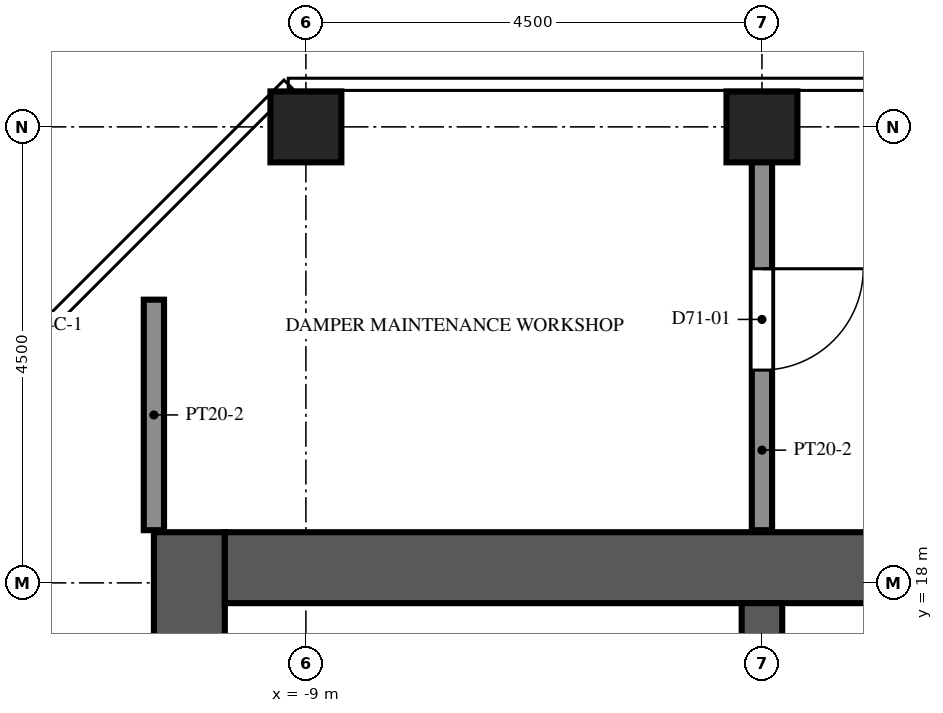
"""IFC4 building model, lengths in metres.
Left out: names, types, materials, properties, quantities, classifications, styles, units other than length and angle.
Written with IfcOpenShell. Run it as: python <this file> out.ifc"""

import sys

from ifc_helpers import new_model, si_unit, direction, frame, frame_2d, origin, origin_2d, place, context, subcontext, project, spatial, rectangle, extrude, element, fill, save


model = new_model("IFC4")
c1 = context("Model", 3, precision=1e-05, world=origin(), true_north=direction((0.0, 1.0)))
c2 = subcontext(c1, "Body", "Model", "MODEL_VIEW")
j1 = project(units=[si_unit("LENGTHUNIT", "METRE"), si_unit("PLANEANGLEUNIT", "RADIAN")], contexts=[c1])
p1 = place(None, origin())
s1 = spatial("IfcSite", under=j1, at=p1, CompositionType="ELEMENT")
p2 = place(p1, origin())
s2 = spatial("IfcBuilding", under=s1, at=p2, CompositionType="ELEMENT")
p3 = place(p2, frame((0.0, 0.0, 316.6)))
s3 = spatial("IfcBuildingStorey", under=s2, at=p3, CompositionType="ELEMENT", Elevation=316.6)
for number, where, z_axis, x_axis in (
    (1, (-9.0, 22.5, 0.0), (0.0, 0.0, 1.0), (1.0, 0.0, 0.0)),
    (2, (-4.5, 22.5, 0.0), (0.0, 0.0, 1.0), (1.0, 0.0, 0.0)),
):
    element("IfcColumn", number, at=place(p3, frame(where, z_axis=z_axis, x_axis=x_axis)), inside=s3, PredefinedType="COLUMN", context=c2, shape_type="SweptSolid", body=[
        extrude(rectangle(XDim=0.7, YDim=0.7, at=origin_2d()), origin(), (0.0, 0.0, 1.0), 4.8),
    ])
p4 = place(p3, frame((-10.15, -9.0, 0.0), z_axis=(0.0, 0.0, 1.0), x_axis=(0.0, 1.0, 0.0)))
e3 = element("IfcWall", 3, at=p4, inside=s3, PredefinedType="SHEAR", context=c2, shape_type="SweptSolid", body=[
    extrude(rectangle(XDim=27.5, YDim=0.7, at=frame_2d((13.75, 0.0))), origin(), (0.0, 0.0, 1.0), 4.8),
])
p5 = place(p4, frame((12.55, 0.0, 0.0)))
e4 = element("IfcOpeningElement", 4, at=p5, cuts=e3, PredefinedType="OPENING", context=c2, shape_type="SweptSolid", body=[
    extrude(rectangle(XDim=2.4, YDim=2.4, at=frame_2d((1.2, 1.2))), frame((0.0, 0.36, 0.0), z_axis=(0.0, -1.0, 0.0), x_axis=(1.0, 0.0, 0.0)), (0.0, 0.0, 1.0), 0.72),
])
p6 = place(p4, frame((6.825, 0.0, 0.0)))
e5 = element("IfcOpeningElement", 5, at=p6, cuts=e3, PredefinedType="OPENING", context=c2, shape_type="SweptSolid", body=[
    extrude(rectangle(XDim=1.2, YDim=2.1, at=frame_2d((0.6, 1.05))), frame((0.0, 0.36, 0.0), z_axis=(0.0, -1.0, 0.0), x_axis=(1.0, 0.0, 0.0)), (0.0, 0.0, 1.0), 0.72),
])
p7 = place(p4, frame((19.475, 0.0, 0.0)))
e6 = element("IfcOpeningElement", 6, at=p7, cuts=e3, PredefinedType="OPENING", context=c2, shape_type="SweptSolid", body=[
    extrude(rectangle(XDim=1.2, YDim=2.1, at=frame_2d((0.6, 1.05))), frame((0.0, 0.36, 0.0), z_axis=(0.0, -1.0, 0.0), x_axis=(1.0, 0.0, 0.0)), (0.0, 0.0, 1.0), 0.72),
])
p8 = place(p3, frame((-9.8, 18.15, 0.0), z_axis=(0.0, 0.0, 1.0), x_axis=(1.0, 0.0, 0.0)))
e7 = element("IfcWall", 7, at=p8, inside=s3, PredefinedType="SHEAR", context=c2, shape_type="SweptSolid", body=[
    extrude(rectangle(XDim=10.6, YDim=0.7, at=frame_2d((5.3, 0.0))), origin(), (0.0, 0.0, 1.0), 4.8),
])
p9 = place(p3, frame((-4.5, 10.2, 0.0), z_axis=(0.0, 0.0, 1.0), x_axis=(0.0, 1.0, 0.0)))
e8 = element("IfcWall", 8, at=p9, inside=s3, PredefinedType="SHEAR", context=c2, shape_type="SweptSolid", body=[
    extrude(rectangle(XDim=7.6, YDim=0.4, at=frame_2d((3.8, 0.0))), origin(), (0.0, 0.0, 1.0), 4.8),
])
p10 = place(p3, frame((-10.5, 18.52, 0.0), z_axis=(0.0, 0.0, 1.0), x_axis=(0.0, 1.0, 0.0)))
e9 = element("IfcWall", 9, at=p10, inside=s3, PredefinedType="PARTITIONING", context=c2, shape_type="SweptSolid", body=[
    extrude(rectangle(XDim=2.275, YDim=0.2, at=frame_2d((1.137, 0.0))), origin(), (0.0, 0.0, 1.0), 4.2),
])
p11 = place(p3, frame((-4.5, 22.355, 0.0), z_axis=(0.0, 0.0, 1.0), x_axis=(0.0, -1.0, 0.0)))
e10 = element("IfcWall", 10, at=p11, inside=s3, PredefinedType="PARTITIONING", context=c2, shape_type="SweptSolid", body=[
    extrude(rectangle(XDim=3.835, YDim=0.2, at=frame_2d((1.917, 0.0))), origin(), (0.0, 0.0, 1.0), 4.2),
])
p12 = place(p11, frame((1.255, 0.0, 0.0)))
e11 = element("IfcOpeningElement", 11, at=p12, cuts=e10, PredefinedType="OPENING", context=c2, shape_type="SweptSolid", body=[
    extrude(rectangle(XDim=1.0, YDim=2.1, at=frame_2d((0.5, 1.05))), frame((0.0, 0.11, 0.0), z_axis=(0.0, -1.0, 0.0), x_axis=(1.0, 0.0, 0.0)), (0.0, 0.0, 1.0), 0.22),
])
p13 = place(p12, origin())
e12 = element("IfcDoor", 12, at=p13, inside=s3, OperationType="SINGLE_SWING_LEFT", PredefinedType="DOOR", context=c2, shape_type="SweptSolid", body=[
    extrude(rectangle(XDim=1.0, YDim=2.1, at=frame_2d((0.5, 1.05))), frame((0.0, 0.025, 0.0), z_axis=(0.0, -1.0, 0.0), x_axis=(1.0, 0.0, 0.0)), (0.0, 0.0, 1.0), 0.05),
])
fill(e11, e12)
save(model, sys.argv[1])
